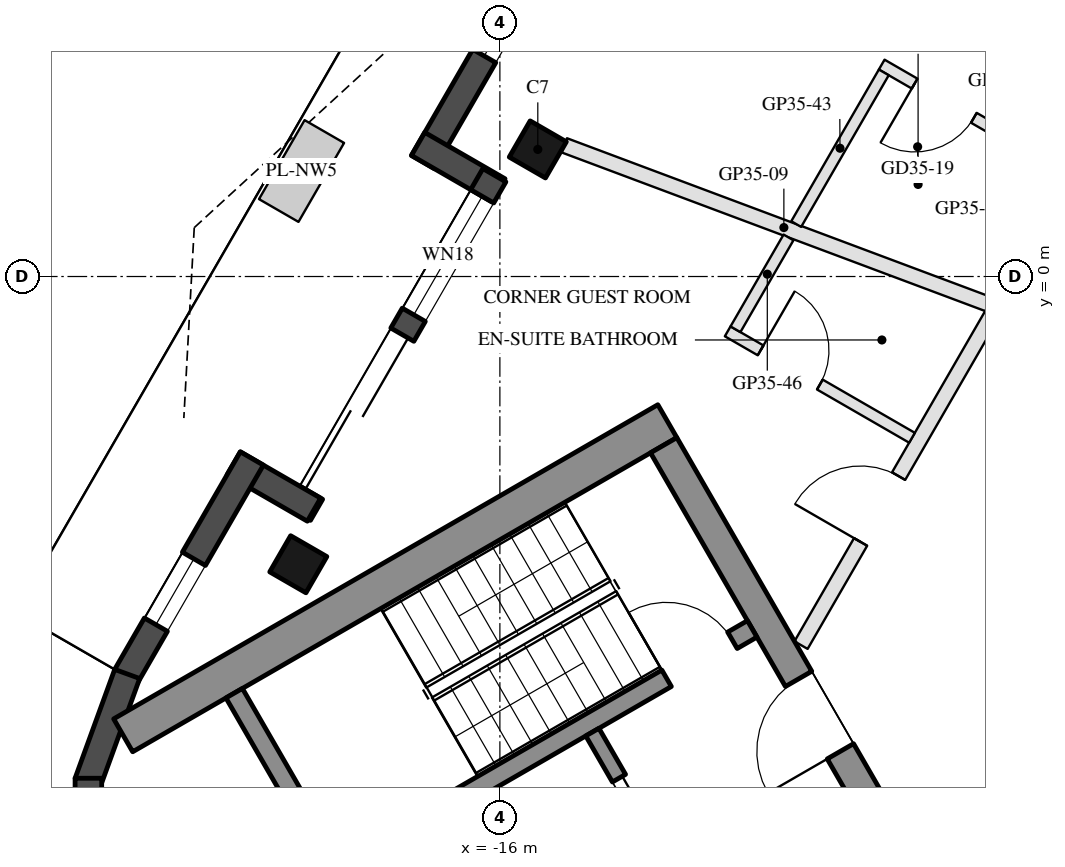
"""IFC4 building model, lengths in metres.
Left out: names, types, materials, properties, quantities, classifications, styles, units other than length and angle.
Written with IfcOpenShell. Run it as: python <this file> out.ifc"""

import sys

from ifc_helpers import new_model, si_unit, direction, frame, frame_2d, origin, origin_2d, place, context, subcontext, project, spatial, rectangle, hollow_rectangle, extrude, boolean, halfspace, element, fill, save


model = new_model("IFC4")
c1 = context("Model", 3, precision=1e-05, world=origin(), true_north=direction((0.0, 1.0)))
c2 = subcontext(c1, "Body", "Model", "MODEL_VIEW")
j1 = project(units=[si_unit("LENGTHUNIT", "METRE"), si_unit("PLANEANGLEUNIT", "RADIAN")], contexts=[c1])
p1 = place(None, origin())
s1 = spatial("IfcSite", under=j1, at=p1, CompositionType="ELEMENT")
p2 = place(p1, origin())
s2 = spatial("IfcBuilding", under=s1, at=p2, CompositionType="ELEMENT")
p3 = place(p2, frame((0.0, 0.0, 324.4)))
s3 = spatial("IfcBuildingStorey", under=s2, at=p3, CompositionType="ELEMENT", Elevation=324.4)
p4 = place(p3, frame((-15.501, 1.672, 0.0), z_axis=(0.0, 0.0, 1.0), x_axis=(0.5, 0.866025403784, 0.0)))
e1 = element("IfcColumn", 1, at=p4, inside=s3, PredefinedType="COLUMN", context=c2, shape_type="SweptSolid", body=[
    boolean("DIFFERENCE", boolean("DIFFERENCE", extrude(hollow_rectangle(XDim=0.55, YDim=0.55, WallThickness=0.025, at=origin_2d()), origin(), (0.0, 0.0, 1.0), 3.7), halfspace(frame((0.0, 0.0, 0.034), z_axis=(0.0, 0.0, 1.0), x_axis=(1.0, 0.0, 0.0)), True)), halfspace(frame((0.0, 0.0, 3.666), z_axis=(0.0, 0.0, 1.0), x_axis=(1.0, 0.0, 0.0)), False)),
])
p5 = place(p3, frame((-18.652, -3.786, 0.0), z_axis=(0.0, 0.0, 1.0), x_axis=(0.5, 0.866025403784, 0.0)))
e2 = element("IfcColumn", 2, at=p5, inside=s3, PredefinedType="COLUMN", context=c2, shape_type="SweptSolid", body=[
    boolean("DIFFERENCE", boolean("DIFFERENCE", extrude(hollow_rectangle(XDim=0.55, YDim=0.55, WallThickness=0.025, at=origin_2d()), origin(), (0.0, 0.0, 1.0), 3.7), halfspace(frame((0.0, 0.0, 0.04), z_axis=(0.0, 0.0, 1.0), x_axis=(1.0, 0.0, 0.0)), True)), halfspace(frame((0.0, 0.0, 3.66), z_axis=(0.0, 0.0, 1.0), x_axis=(1.0, 0.0, 0.0)), False)),
])
p6 = place(p3, frame((-12.961, 8.522, 0.0), z_axis=(0.0, 0.0, 1.0), x_axis=(-0.499995447853, -0.866028031952, 0.0)))
e3 = element("IfcWall", 3, at=p6, inside=s3, PredefinedType="SOLIDWALL", context=c2, shape_type="SweptSolid", body=[
    extrude(rectangle(XDim=8.103, YDim=0.35, at=frame_2d((4.051, 0.0))), origin(), (0.0, 0.0, 1.0), 3.55),
])
p7 = place(p6, frame((2.39, 0.0, 0.0)))
e4 = element("IfcOpeningElement", 4, at=p7, cuts=e3, PredefinedType="OPENING", context=c2, shape_type="SweptSolid", body=[
    extrude(rectangle(XDim=1.8, YDim=2.4, at=frame_2d((0.9, 1.2))), frame((0.0, 0.185, 0.0), z_axis=(0.0, -1.0, 0.0), x_axis=(1.0, 0.0, 0.0)), (0.0, 0.0, 1.0), 0.37),
])
p8 = place(p6, frame((4.49, 0.0, 0.3)))
e5 = element("IfcOpeningElement", 5, at=p8, cuts=e3, PredefinedType="OPENING", context=c2, shape_type="SweptSolid", body=[
    extrude(rectangle(XDim=2.0, YDim=2.65, at=frame_2d((1.0, 1.325))), frame((0.0, 0.185, 0.0), z_axis=(0.0, -1.0, 0.0), x_axis=(1.0, 0.0, 0.0)), (0.0, 0.0, 1.0), 0.37),
])
p9 = place(p3, frame((-17.076, 1.744, 0.0), z_axis=(0.0, 0.0, 1.0), x_axis=(0.866005645448, -0.500034220881, 0.0)))
e6 = element("IfcWall", 6, at=p9, inside=s3, PredefinedType="SOLIDWALL", context=c2, shape_type="SweptSolid", body=[
    extrude(rectangle(XDim=1.22, YDim=0.35, at=frame_2d((0.61, 0.0))), origin(), (0.0, 0.0, 1.0), 3.55),
])
p10 = place(p3, frame((-16.073, 1.333, 0.0), z_axis=(0.0, 0.0, 1.0), x_axis=(-0.499999159329, -0.866025889145, 0.0)))
e7 = element("IfcWall", 7, at=p10, inside=s3, PredefinedType="SOLIDWALL", context=c2, shape_type="SweptSolid", body=[
    extrude(rectangle(XDim=5.143, YDim=0.35, at=frame_2d((2.571, 0.0))), origin(), (0.0, 0.0, 1.0), 3.55),
])
p11 = place(p10, frame((2.422, 0.0, 0.0)))
e8 = element("IfcOpeningElement", 8, at=p11, cuts=e7, PredefinedType="OPENING", context=c2, shape_type="SweptSolid", body=[
    extrude(rectangle(XDim=2.4, YDim=2.4, at=frame_2d((1.2, 1.2))), frame((0.0, 0.185, 0.0), z_axis=(0.0, -1.0, 0.0), x_axis=(1.0, 0.0, 0.0)), (0.0, 0.0, 1.0), 0.37),
])
p12 = place(p10, frame((0.32, 0.0, 0.3)))
e9 = element("IfcOpeningElement", 9, at=p12, cuts=e7, PredefinedType="OPENING", context=c2, shape_type="SweptSolid", body=[
    extrude(rectangle(XDim=1.8, YDim=2.65, at=frame_2d((0.9, 1.325))), frame((0.0, 0.185, 0.0), z_axis=(0.0, -1.0, 0.0), x_axis=(1.0, 0.0, 0.0)), (0.0, 0.0, 1.0), 0.37),
])
p13 = place(p3, frame((-18.446, -3.068, 0.0), z_axis=(0.0, 0.0, 1.0), x_axis=(-0.866005645448, 0.500034220881, 0.0)))
e10 = element("IfcWall", 10, at=p13, inside=s3, PredefinedType="SOLIDWALL", context=c2, shape_type="SweptSolid", body=[
    extrude(rectangle(XDim=1.22, YDim=0.35, at=frame_2d((0.61, 0.0))), origin(), (0.0, 0.0, 1.0), 3.55),
])
p14 = place(p3, frame((-19.263, -2.394, 0.0), z_axis=(0.0, 0.0, 1.0), x_axis=(-0.500022895934, -0.866012184407, 0.0)))
e11 = element("IfcWall", 11, at=p14, inside=s3, PredefinedType="SOLIDWALL", context=c2, shape_type="SweptSolid", body=[
    extrude(rectangle(XDim=3.306, YDim=0.35, at=frame_2d((1.653, 0.0))), origin(), (0.0, 0.0, 1.0), 3.55),
])
p15 = place(p14, frame((1.525, 0.0, 0.3)))
e12 = element("IfcOpeningElement", 12, at=p15, cuts=e11, PredefinedType="OPENING", context=c2, shape_type="SweptSolid", body=[
    extrude(rectangle(XDim=1.0, YDim=2.65, at=frame_2d((0.5, 1.325))), frame((0.0, 0.185, 0.0), z_axis=(0.0, -1.0, 0.0), x_axis=(1.0, 0.0, 0.0)), (0.0, 0.0, 1.0), 0.37),
])
for number, where, z_axis, x_axis in (
    (13, (-20.903, -5.229, 0.0), (0.0, 0.0, 1.0), (-0.342, -0.94, 0.0)),
    (14, (-21.414, -6.602, 0.0), (0.0, 0.0, 1.0), (0.0, -1.0, 0.0)),
):
    element("IfcWall", number, at=place(p3, frame(where, z_axis=z_axis, x_axis=x_axis)), inside=s3, PredefinedType="SOLIDWALL", context=c2, shape_type="SweptSolid", body=[
        extrude(rectangle(XDim=1.524, YDim=0.35, at=frame_2d((0.762, 0.0))), origin(), (0.0, 0.0, 1.0), 3.55),
    ])
p16 = place(p3, frame((-13.797, -1.903, 0.0), z_axis=(0.0, 0.0, 1.0), x_axis=(-0.866030186143, -0.49999171662, 0.0)))
e15 = element("IfcWall", 15, at=p16, inside=s3, PredefinedType="SHEAR", context=c2, shape_type="SweptSolid", body=[
    extrude(rectangle(XDim=8.267, YDim=0.5, at=frame_2d((4.134, 0.0))), origin(), (0.0, 0.0, 1.0), 3.5),
])
p17 = place(p3, frame((-13.845, -2.22, 0.0), z_axis=(0.0, 0.0, 1.0), x_axis=(0.500004234368, -0.866022959057, 0.0)))
e16 = element("IfcWall", 16, at=p17, inside=s3, PredefinedType="SHEAR", context=c2, shape_type="SweptSolid", body=[
    extrude(rectangle(XDim=10.0, YDim=0.4, at=frame_2d((5.0, 0.0))), origin(), (0.0, 0.0, 1.0), 3.5),
])
p18 = place(p17, frame((3.55, 0.0, 0.0)))
e17 = element("IfcOpeningElement", 17, at=p18, cuts=e16, PredefinedType="OPENING", context=c2, shape_type="SweptSolid", body=[
    extrude(rectangle(XDim=1.1, YDim=2.1, at=frame_2d((0.55, 1.05))), frame((0.0, 0.21, 0.0), z_axis=(0.0, -1.0, 0.0), x_axis=(1.0, 0.0, 0.0)), (0.0, 0.0, 1.0), 0.42),
])
p19 = place(p17, frame((5.85, 0.0, 0.0)))
e18 = element("IfcOpeningElement", 18, at=p19, cuts=e16, PredefinedType="OPENING", context=c2, shape_type="SweptSolid", body=[
    extrude(rectangle(XDim=1.4, YDim=2.1, at=frame_2d((0.7, 1.05))), frame((0.0, 0.21, 0.0), z_axis=(0.0, -1.0, 0.0), x_axis=(1.0, 0.0, 0.0)), (0.0, 0.0, 1.0), 0.42),
])
p20 = place(p3, frame((-12.681, -4.636, 0.0), z_axis=(0.0, 0.0, 1.0), x_axis=(-0.866021702275, -0.500006411147, 0.0)))
e19 = element("IfcWall", 19, at=p20, inside=s3, PredefinedType="SHEAR", context=c2, shape_type="SweptSolid", body=[
    extrude(rectangle(XDim=6.45, YDim=0.25, at=frame_2d((3.225, 0.0))), origin(), (0.0, 0.0, 1.0), 3.5),
])
p21 = place(p20, frame((0.3, 0.0, 0.0)))
e20 = element("IfcOpeningElement", 20, at=p21, cuts=e19, PredefinedType="OPENING", context=c2, shape_type="SweptSolid", body=[
    extrude(rectangle(XDim=1.0, YDim=2.1, at=frame_2d((0.5, 1.05))), frame((0.0, 0.135, 0.0), z_axis=(0.0, -1.0, 0.0), x_axis=(1.0, 0.0, 0.0)), (0.0, 0.0, 1.0), 0.27),
])
p22 = place(p3, frame((-19.496, -5.482, 0.0), z_axis=(0.0, 0.0, 1.0), x_axis=(0.499990435942, -0.866030925526, 0.0)))
e21 = element("IfcWall", 21, at=p22, inside=s3, PredefinedType="SHEAR", context=c2, shape_type="SweptSolid", body=[
    extrude(rectangle(XDim=2.55, YDim=0.25, at=frame_2d((1.275, 0.0))), origin(), (0.0, 0.0, 1.0), 3.5),
])
p23 = place(p3, frame((-14.783, -5.995, 0.0), z_axis=(0.0, 0.0, 1.0), x_axis=(0.49994636267, -0.866056369097, 0.0)))
e22 = element("IfcWall", 22, at=p23, inside=s3, PredefinedType="SHEAR", context=c2, shape_type="SweptSolid", body=[
    extrude(rectangle(XDim=2.8, YDim=0.2, at=frame_2d((1.4, 0.0))), origin(), (0.0, 0.0, 1.0), 3.5),
])
p24 = place(p23, frame((0.7, 0.0, 0.0)))
e23 = element("IfcOpeningElement", 23, at=p24, cuts=e22, PredefinedType="OPENING", context=c2, shape_type="SweptSolid", body=[
    extrude(rectangle(XDim=1.2, YDim=2.1, at=frame_2d((0.6, 1.05))), frame((0.0, 0.11, 0.0), z_axis=(0.0, -1.0, 0.0), x_axis=(1.0, 0.0, 0.0)), (0.0, 0.0, 1.0), 0.22),
])
p25 = place(p3, frame((-15.152, 1.726, 0.0), z_axis=(0.0, 0.0, 1.0), x_axis=(0.936472215665, -0.350741770091, 0.0)))
e24 = element("IfcWall", 24, at=p25, inside=s3, PredefinedType="PARTITIONING", context=c2, shape_type="SweptSolid", body=[
    extrude(rectangle(XDim=6.169, YDim=0.2, at=frame_2d((3.084, 0.0))), origin(), (0.0, 0.0, 1.0), 3.1),
])
p26 = place(p3, frame((-8.552, 1.388, 0.0), z_axis=(0.0, 0.0, 1.0), x_axis=(-0.866056369097, 0.49994636267, 0.0)))
e25 = element("IfcWall", 25, at=p26, inside=s3, PredefinedType="PARTITIONING", context=c2, shape_type="SweptSolid", body=[
    extrude(rectangle(XDim=2.8, YDim=0.15, at=frame_2d((1.4, 0.0))), origin(), (0.0, 0.0, 1.0), 3.15),
])
p27 = place(p26, frame((1.4, 0.0, 0.0)))
e26 = element("IfcOpeningElement", 26, at=p27, cuts=e25, PredefinedType="OPENING", context=c2, shape_type="SweptSolid", body=[
    extrude(rectangle(XDim=0.9, YDim=2.1, at=frame_2d((0.45, 1.05))), frame((0.0, 0.085, 0.0), z_axis=(0.0, -1.0, 0.0), x_axis=(1.0, 0.0, 0.0)), (0.0, 0.0, 1.0), 0.17),
])
p28 = place(p3, frame((-10.949, 2.686, 0.0), z_axis=(0.0, 0.0, 1.0), x_axis=(-0.500012835235, -0.866017993231, 0.0)))
e27 = element("IfcWall", 27, at=p28, inside=s3, PredefinedType="PARTITIONING", context=c2, shape_type="SweptSolid", body=[
    extrude(rectangle(XDim=2.305, YDim=0.15, at=frame_2d((1.152, 0.0))), origin(), (0.0, 0.0, 1.0), 3.15),
])
p29 = place(p3, frame((-12.038, -4.85, 0.0), z_axis=(0.0, 0.0, 1.0), x_axis=(0.500003693016, 0.86602327161, 0.0)))
e28 = element("IfcWall", 28, at=p29, inside=s3, PredefinedType="PARTITIONING", context=c2, shape_type="SweptSolid", body=[
    extrude(rectangle(XDim=5.035, YDim=0.2, at=frame_2d((2.517, 0.0))), origin(), (0.0, 0.0, 1.0), 3.15),
])
p30 = place(p29, frame((1.568, 0.0, 0.0)))
e29 = element("IfcOpeningElement", 29, at=p30, cuts=e28, PredefinedType="OPENING", context=c2, shape_type="SweptSolid", body=[
    extrude(rectangle(XDim=1.0, YDim=2.1, at=frame_2d((0.5, 1.05))), frame((0.0, 0.11, 0.0), z_axis=(0.0, -1.0, 0.0), x_axis=(1.0, 0.0, 0.0)), (0.0, 0.0, 1.0), 0.22),
])
p31 = place(p3, frame((-13.003, -0.722, 0.0), z_axis=(0.0, 0.0, 1.0), x_axis=(0.866056369097, -0.49994636267, 0.0)))
e30 = element("IfcWall", 30, at=p31, inside=s3, PredefinedType="PARTITIONING", context=c2, shape_type="SweptSolid", body=[
    extrude(rectangle(XDim=2.8, YDim=0.15, at=frame_2d((1.4, 0.0))), origin(), (0.0, 0.0, 1.0), 3.55),
])
p32 = place(p31, frame((0.5, 0.0, 0.0)))
e31 = element("IfcOpeningElement", 31, at=p32, cuts=e30, PredefinedType="OPENING", context=c2, shape_type="SweptSolid", body=[
    extrude(rectangle(XDim=0.9, YDim=2.1, at=frame_2d((0.45, 1.05))), frame((0.0, 0.085, 0.0), z_axis=(0.0, -1.0, 0.0), x_axis=(1.0, 0.0, 0.0)), (0.0, 0.0, 1.0), 0.17),
])
p33 = place(p3, frame((-12.203, 0.514, 0.0), z_axis=(0.0, 0.0, 1.0), x_axis=(-0.5000152428, -0.866016603171, 0.0)))
e32 = element("IfcWall", 32, at=p33, inside=s3, PredefinedType="PARTITIONING", context=c2, shape_type="SweptSolid", body=[
    extrude(rectangle(XDim=1.396, YDim=0.15, at=frame_2d((0.698, 0.0))), origin(), (0.0, 0.0, 1.0), 3.15),
])
p34 = place(p8, origin())
e33 = element("IfcWindow", 33, at=p34, inside=s3, PartitioningType="SINGLE_PANEL", PredefinedType="WINDOW", context=c2, shape_type="SweptSolid", body=[
    extrude(rectangle(XDim=2.0, YDim=2.65, at=frame_2d((1.0, 1.325))), frame((0.0, 0.03, 0.0), z_axis=(0.0, -1.0, 0.0), x_axis=(1.0, 0.0, 0.0)), (0.0, 0.0, 1.0), 0.06),
])
fill(e5, e33)
p35 = place(p11, frame((2.4, 0.0, 0.0), z_axis=(0.0, 0.0, 1.0), x_axis=(-1.0, 0.0, 0.0)))
e34 = element("IfcDoor", 34, at=p35, inside=s3, OperationType="SLIDING_TO_LEFT", PredefinedType="DOOR", context=c2, shape_type="SweptSolid", body=[
    extrude(rectangle(XDim=2.4, YDim=2.4, at=frame_2d((1.2, 1.2))), frame((0.0, 0.025, 0.0), z_axis=(0.0, -1.0, 0.0), x_axis=(1.0, 0.0, 0.0)), (0.0, 0.0, 1.0), 0.05),
])
fill(e8, e34)
p36 = place(p12, origin())
e35 = element("IfcWindow", 35, at=p36, inside=s3, PartitioningType="SINGLE_PANEL", PredefinedType="WINDOW", context=c2, shape_type="SweptSolid", body=[
    extrude(rectangle(XDim=1.8, YDim=2.65, at=frame_2d((0.9, 1.325))), frame((0.0, 0.03, 0.0), z_axis=(0.0, -1.0, 0.0), x_axis=(1.0, 0.0, 0.0)), (0.0, 0.0, 1.0), 0.06),
])
fill(e9, e35)
p37 = place(p15, origin())
e36 = element("IfcWindow", 36, at=p37, inside=s3, PartitioningType="SINGLE_PANEL", PredefinedType="WINDOW", context=c2, shape_type="SweptSolid", body=[
    extrude(rectangle(XDim=1.0, YDim=2.65, at=frame_2d((0.5, 1.325))), frame((0.0, 0.03, 0.0), z_axis=(0.0, -1.0, 0.0), x_axis=(1.0, 0.0, 0.0)), (0.0, 0.0, 1.0), 0.06),
])
fill(e12, e36)
p38 = place(p24, origin())
e37 = element("IfcDoor", 37, at=p38, inside=s3, OperationType="DOUBLE_DOOR_SLIDING", PredefinedType="DOOR", context=c2, shape_type="SweptSolid", body=[
    extrude(rectangle(XDim=1.2, YDim=2.1, at=frame_2d((0.6, 1.05))), frame((0.0, 0.025, 0.0), z_axis=(0.0, -1.0, 0.0), x_axis=(1.0, 0.0, 0.0)), (0.0, 0.0, 1.0), 0.05),
])
fill(e23, e37)
p39 = place(p18, frame((1.1, 0.0, 0.0), z_axis=(0.0, 0.0, 1.0), x_axis=(-1.0, 0.0, 0.0)))
e38 = element("IfcDoor", 38, at=p39, inside=s3, OperationType="SINGLE_SWING_LEFT", PredefinedType="DOOR", context=c2, shape_type="SweptSolid", body=[
    extrude(rectangle(XDim=1.1, YDim=2.1, at=frame_2d((0.55, 1.05))), frame((0.0, 0.025, 0.0), z_axis=(0.0, -1.0, 0.0), x_axis=(1.0, 0.0, 0.0)), (0.0, 0.0, 1.0), 0.05),
])
fill(e17, e38)
p40 = place(p21, frame((1.0, 0.0, 0.0), z_axis=(0.0, 0.0, 1.0), x_axis=(-1.0, 0.0, 0.0)))
e39 = element("IfcDoor", 39, at=p40, inside=s3, OperationType="SINGLE_SWING_LEFT", PredefinedType="DOOR", context=c2, shape_type="SweptSolid", body=[
    extrude(rectangle(XDim=1.0, YDim=2.1, at=frame_2d((0.5, 1.05))), frame((0.0, 0.025, 0.0), z_axis=(0.0, -1.0, 0.0), x_axis=(1.0, 0.0, 0.0)), (0.0, 0.0, 1.0), 0.05),
])
fill(e20, e39)
p41 = place(p27, origin())
e40 = element("IfcDoor", 40, at=p41, inside=s3, OperationType="SINGLE_SWING_RIGHT", PredefinedType="DOOR", context=c2, shape_type="SweptSolid", body=[
    extrude(rectangle(XDim=0.9, YDim=2.1, at=frame_2d((0.45, 1.05))), frame((0.0, 0.025, 0.0), z_axis=(0.0, -1.0, 0.0), x_axis=(1.0, 0.0, 0.0)), (0.0, 0.0, 1.0), 0.05),
])
fill(e26, e40)
p42 = place(p32, origin())
e41 = element("IfcDoor", 41, at=p42, inside=s3, OperationType="SINGLE_SWING_LEFT", PredefinedType="DOOR", context=c2, shape_type="SweptSolid", body=[
    extrude(rectangle(XDim=0.9, YDim=2.1, at=frame_2d((0.45, 1.05))), frame((0.0, 0.025, 0.0), z_axis=(0.0, -1.0, 0.0), x_axis=(1.0, 0.0, 0.0)), (0.0, 0.0, 1.0), 0.05),
])
fill(e31, e41)
p43 = place(p30, origin())
e42 = element("IfcDoor", 42, at=p43, inside=s3, OperationType="SINGLE_SWING_LEFT", PredefinedType="DOOR", context=c2, shape_type="SweptSolid", body=[
    extrude(rectangle(XDim=1.0, YDim=2.1, at=frame_2d((0.5, 1.05))), frame((0.0, 0.025, 0.0), z_axis=(0.0, -1.0, 0.0), x_axis=(1.0, 0.0, 0.0)), (0.0, 0.0, 1.0), 0.05),
])
fill(e29, e42)
save(model, sys.argv[1])
